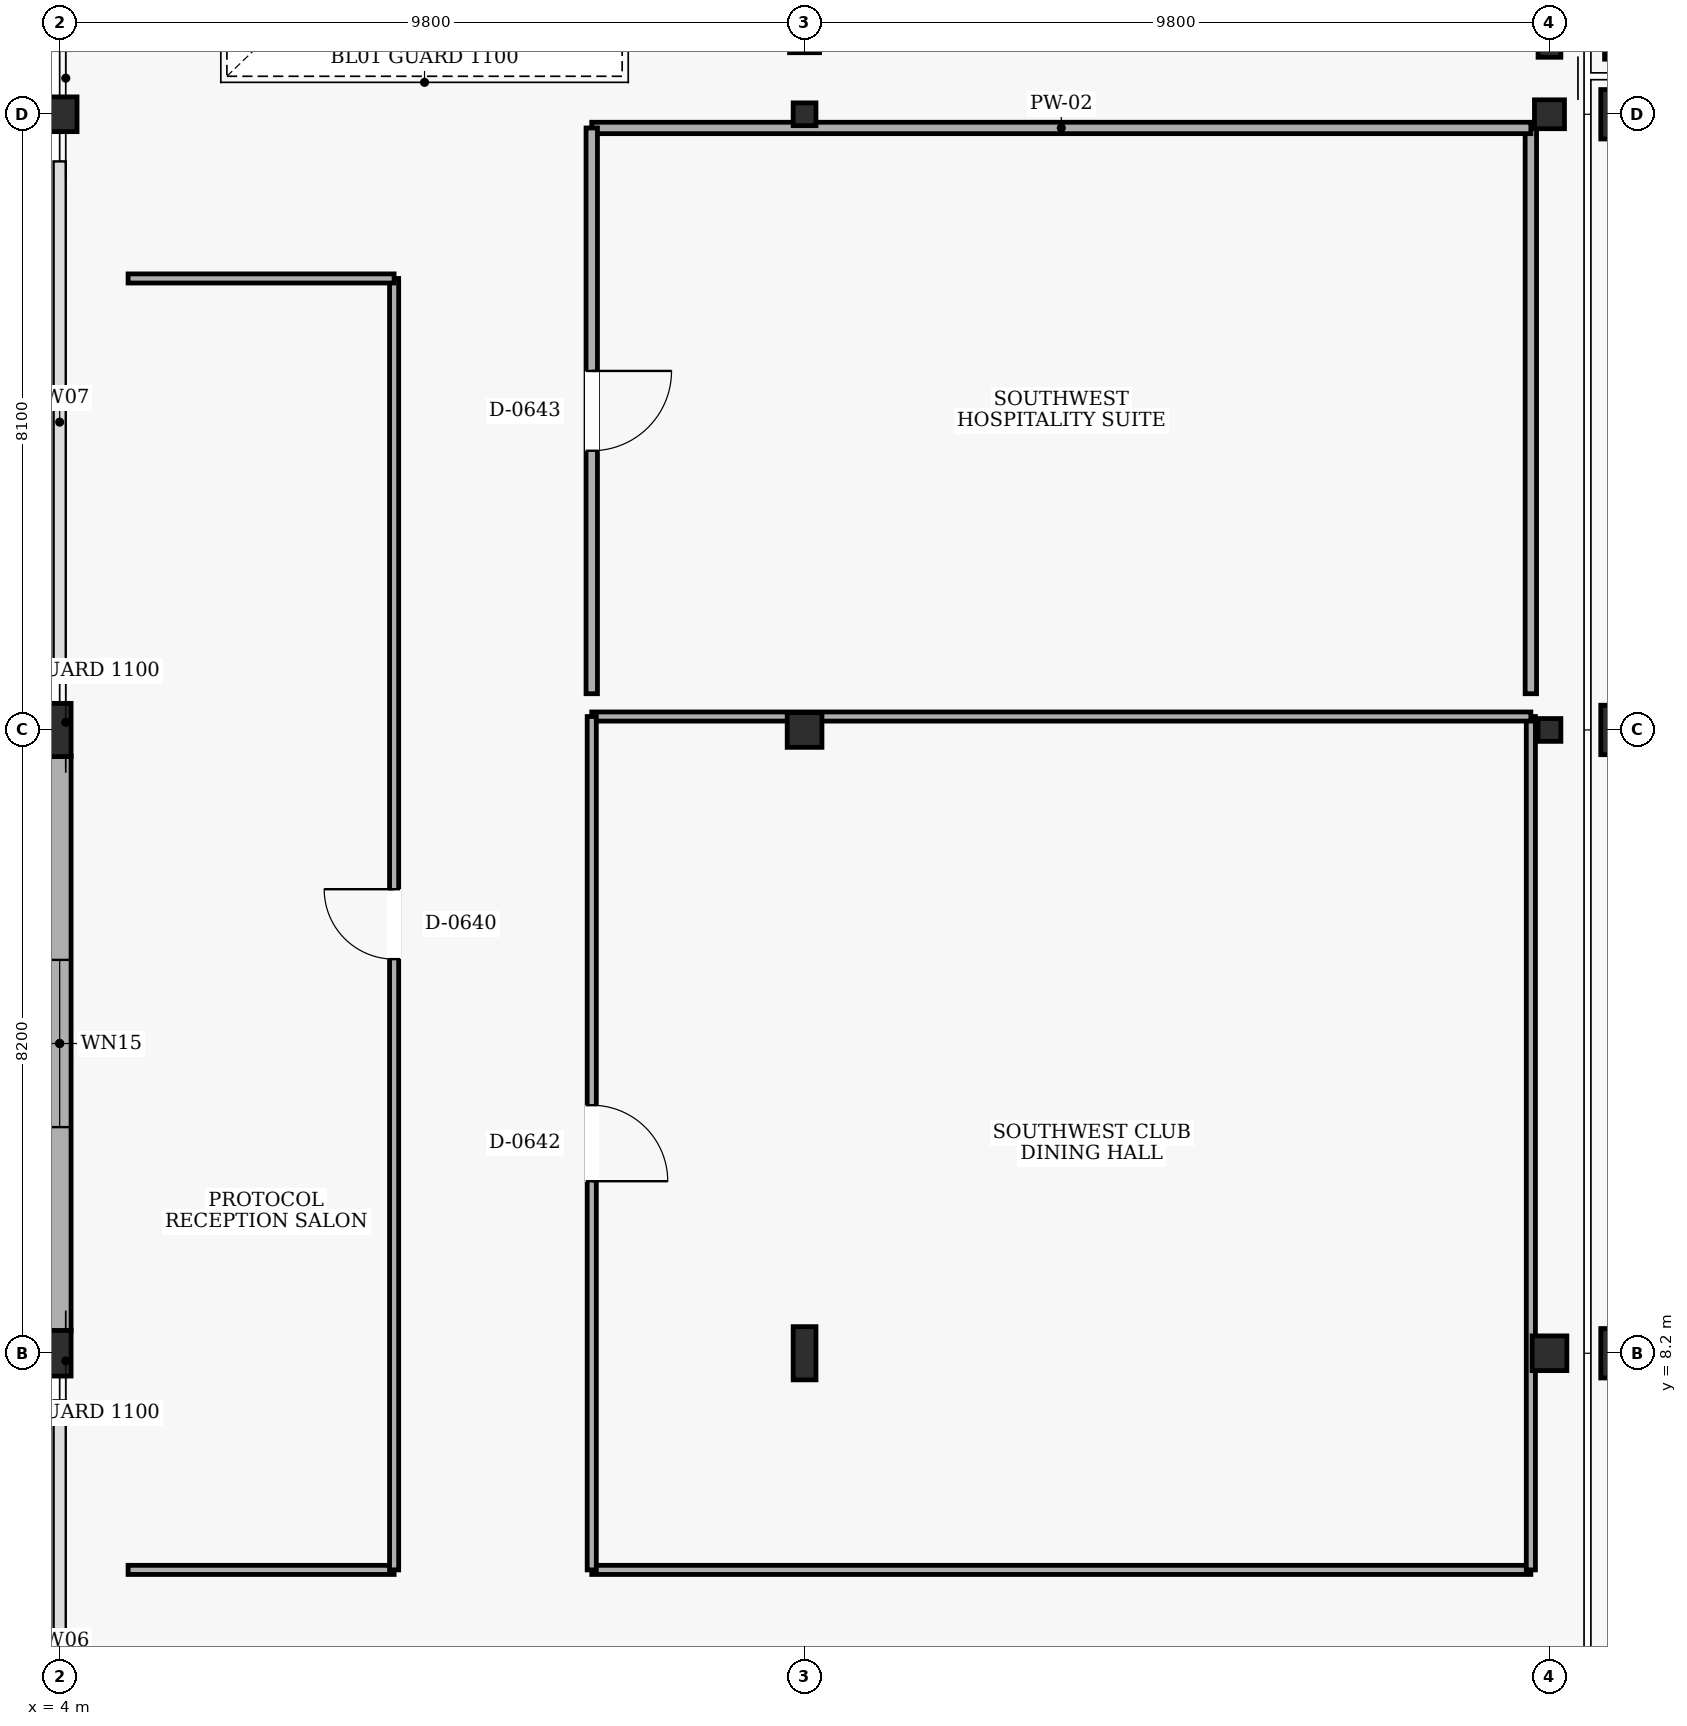
"""IFC4 building model, lengths in metres.
Left out: names, types, materials, properties, quantities, classifications, styles, units other than length and angle.
Written with IfcOpenShell. Run it as: python <this file> out.ifc"""

import sys

from ifc_helpers import new_model, si_unit, direction, frame, frame_2d, origin, origin_2d, place, context, subcontext, project, spatial, rectangle, hollow_rectangle, hollow_circle, i_section, extrude, element, fill, save


model = new_model("IFC4")
c1 = context("Model", 3, precision=1e-05, world=origin(), true_north=direction((0.0, 1.0)))
c2 = subcontext(c1, "Body", "Model", "MODEL_VIEW")
j1 = project(units=[si_unit("LENGTHUNIT", "METRE"), si_unit("PLANEANGLEUNIT", "RADIAN")], contexts=[c1])
p1 = place(None, origin())
s1 = spatial("IfcSite", under=j1, at=p1, CompositionType="ELEMENT")
p2 = place(p1, origin())
s2 = spatial("IfcBuilding", under=s1, at=p2, CompositionType="ELEMENT")
p3 = place(p2, frame((0.0, 0.0, 10.2)))
s3 = spatial("IfcBuildingStorey", under=s2, at=p3, CompositionType="ELEMENT", Elevation=10.2)
p4 = place(p3, frame((4.0, 8.2, 0.0), z_axis=(0.0, 0.0, 1.0), x_axis=(1.0, 0.0, 0.0)))
e1 = element("IfcColumn", 1, at=p4, inside=s3, PredefinedType="COLUMN", context=c2, shape_type="SweptSolid", body=[
    extrude(i_section(OverallWidth=0.3, OverallDepth=0.6, WebThickness=0.015, FlangeThickness=0.03, at=origin_2d()), origin(), (0.0, 0.0, 1.0), 4.8),
])
p5 = place(p3, frame((4.0, 16.4, 0.0), z_axis=(0.0, 0.0, 1.0), x_axis=(1.0, 0.0, 0.0)))
e2 = element("IfcColumn", 2, at=p5, inside=s3, PredefinedType="COLUMN", context=c2, shape_type="SweptSolid", body=[
    extrude(i_section(OverallWidth=0.3, OverallDepth=0.7, WebThickness=0.017, FlangeThickness=0.032, at=origin_2d()), origin(), (0.0, 0.0, 1.0), 4.8),
])
p6 = place(p3, frame((4.0, 24.5, 0.0), z_axis=(0.0, 0.0, 1.0), x_axis=(1.0, 0.0, 0.0)))
e3 = element("IfcColumn", 3, at=p6, inside=s3, PredefinedType="COLUMN", context=c2, shape_type="SweptSolid", body=[
    extrude(hollow_circle(Radius=0.229, WallThickness=0.02, at=origin_2d()), origin(), (0.0, 0.0, 1.0), 4.8),
])
p7 = place(p3, frame((13.8, 8.2, 0.0), z_axis=(0.0, 0.0, 1.0), x_axis=(1.0, 0.0, 0.0)))
e4 = element("IfcColumn", 4, at=p7, inside=s3, PredefinedType="COLUMN", context=c2, shape_type="SweptSolid", body=[
    extrude(i_section(OverallWidth=0.3, OverallDepth=0.7, WebThickness=0.017, FlangeThickness=0.032, at=origin_2d()), origin(), (0.0, 0.0, 1.0), 4.8),
])
p8 = place(p3, frame((13.8, 16.4, 0.0), z_axis=(0.0, 0.0, 1.0), x_axis=(1.0, 0.0, 0.0)))
e5 = element("IfcColumn", 5, at=p8, inside=s3, PredefinedType="COLUMN", context=c2, shape_type="SweptSolid", body=[
    extrude(hollow_circle(Radius=0.229, WallThickness=0.02, at=origin_2d()), origin(), (0.0, 0.0, 1.0), 4.8),
])
p9 = place(p3, frame((13.8, 24.5, 0.0), z_axis=(0.0, 0.0, 1.0), x_axis=(1.0, 0.0, 0.0)))
e6 = element("IfcColumn", 6, at=p9, inside=s3, PredefinedType="COLUMN", context=c2, shape_type="SweptSolid", body=[
    extrude(hollow_rectangle(XDim=0.3, YDim=0.3, WallThickness=0.016, at=origin_2d()), origin(), (0.0, 0.0, 1.0), 4.8),
])
p10 = place(p3, frame((13.8, 25.5, 0.0), z_axis=(0.0, 0.0, 1.0), x_axis=(1.0, 0.0, 0.0)))
e7 = element("IfcColumn", 7, at=p10, inside=s3, PredefinedType="COLUMN", context=c2, shape_type="SweptSolid", body=[
    extrude(i_section(OverallWidth=0.395, OverallDepth=0.38, WebThickness=0.019, FlangeThickness=0.03, at=origin_2d()), origin(), (0.0, 0.0, 1.0), 4.8),
])
p11 = place(p3, frame((23.6, 8.2, 0.0), z_axis=(0.0, 0.0, 1.0), x_axis=(1.0, 0.0, 0.0)))
e8 = element("IfcColumn", 8, at=p11, inside=s3, PredefinedType="COLUMN", context=c2, shape_type="SweptSolid", body=[
    extrude(hollow_circle(Radius=0.229, WallThickness=0.02, at=origin_2d()), origin(), (0.0, 0.0, 1.0), 4.8),
])
p12 = place(p3, frame((23.6, 16.4, 0.0), z_axis=(0.0, 0.0, 1.0), x_axis=(1.0, 0.0, 0.0)))
e9 = element("IfcColumn", 9, at=p12, inside=s3, PredefinedType="COLUMN", context=c2, shape_type="SweptSolid", body=[
    extrude(hollow_rectangle(XDim=0.3, YDim=0.3, WallThickness=0.016, at=origin_2d()), origin(), (0.0, 0.0, 1.0), 4.8),
])
p13 = place(p3, frame((23.6, 24.5, 0.0), z_axis=(0.0, 0.0, 1.0), x_axis=(1.0, 0.0, 0.0)))
e10 = element("IfcColumn", 10, at=p13, inside=s3, PredefinedType="COLUMN", context=c2, shape_type="SweptSolid", body=[
    extrude(i_section(OverallWidth=0.395, OverallDepth=0.38, WebThickness=0.019, FlangeThickness=0.03, at=origin_2d()), origin(), (0.0, 0.0, 1.0), 4.8),
])
p14 = place(p3, frame((23.6, 25.5, 0.0), z_axis=(0.0, 0.0, 1.0), x_axis=(1.0, 0.0, 0.0)))
e11 = element("IfcColumn", 11, at=p14, inside=s3, PredefinedType="COLUMN", context=c2, shape_type="SweptSolid", body=[
    extrude(i_section(OverallWidth=0.3, OverallDepth=0.5, WebThickness=0.014, FlangeThickness=0.028, at=origin_2d()), origin(), (0.0, 0.0, 1.0), 4.8),
])
for number, where, z_axis, x_axis in (
    (12, (24.6, 8.2, 0.0), (0.0, 0.0, 1.0), (1.0, 0.0, 0.0)),
    (13, (24.6, 16.4, 0.0), (0.0, 0.0, 1.0), (1.0, 0.0, 0.0)),
    (14, (24.6, 24.5, 0.0), (0.0, 0.0, 1.0), (1.0, 0.0, 0.0)),
):
    element("IfcColumn", number, at=place(p3, frame(where, z_axis=z_axis, x_axis=x_axis)), inside=s3, PredefinedType="COLUMN", context=c2, shape_type="SweptSolid", body=[
        extrude(rectangle(XDim=0.65, YDim=0.65, at=origin_2d()), origin(), (0.0, 0.0, 1.0), 4.8),
    ])
p15 = place(p3, frame((24.6, 25.5, 0.0), z_axis=(0.0, 0.0, 1.0), x_axis=(1.0, 0.0, 0.0)))
e15 = element("IfcColumn", 15, at=p15, inside=s3, PredefinedType="COLUMN", context=c2, shape_type="SweptSolid", body=[
    extrude(rectangle(XDim=0.55, YDim=0.55, at=origin_2d()), origin(), (0.0, 0.0, 1.0), 4.8),
])
p16 = place(p3, frame((4.0, 8.495, 0.0), z_axis=(0.0, 0.0, 1.0), x_axis=(0.0, 1.0, 0.0)))
e16 = element("IfcWall", 16, at=p16, inside=s3, PredefinedType="SOLIDWALL", context=c2, shape_type="SweptSolid", body=[
    extrude(rectangle(XDim=7.56, YDim=0.3, at=frame_2d((3.78, 0.0))), origin(), (0.0, 0.0, 1.0), 3.78),
])
p17 = place(p16, frame((2.68, 0.0, 0.9)))
e17 = element("IfcOpeningElement", 17, at=p17, cuts=e16, PredefinedType="OPENING", context=c2, shape_type="SweptSolid", body=[
    extrude(rectangle(XDim=2.2, YDim=2.1, at=frame_2d((1.1, 1.05))), frame((0.0, 0.16, 0.0), z_axis=(0.0, -1.0, 0.0), x_axis=(1.0, 0.0, 0.0)), (0.0, 0.0, 1.0), 0.32),
])
p18 = place(p3, frame((4.9, 5.35, 0.0), z_axis=(0.0, 0.0, 1.0), x_axis=(1.0, 0.0, 0.0)))
e18 = element("IfcWall", 18, at=p18, inside=s3, PredefinedType="PARTITIONING", context=c2, shape_type="SweptSolid", body=[
    extrude(rectangle(XDim=3.5, YDim=0.12, at=frame_2d((1.75, 0.0))), origin(), (0.0, 0.0, 1.0), 4.48),
])
p19 = place(p3, frame((8.4, 5.35, 0.0), z_axis=(0.0, 0.0, 1.0), x_axis=(0.0, 1.0, 0.0)))
e19 = element("IfcWall", 19, at=p19, inside=s3, PredefinedType="PARTITIONING", context=c2, shape_type="SweptSolid", body=[
    extrude(rectangle(XDim=16.99, YDim=0.12, at=frame_2d((8.495, 0.0))), origin(), (0.0, 0.0, 1.0), 4.48),
])
p20 = place(p19, frame((8.035, 0.0, 0.0)))
e20 = element("IfcOpeningElement", 20, at=p20, cuts=e19, PredefinedType="OPENING", context=c2, shape_type="SweptSolid", body=[
    extrude(rectangle(XDim=0.92, YDim=2.1, at=frame_2d((0.46, 1.05))), frame((0.0, 0.07, 0.0), z_axis=(0.0, -1.0, 0.0), x_axis=(1.0, 0.0, 0.0)), (0.0, 0.0, 1.0), 0.14),
])
p21 = place(p3, frame((8.4, 22.34, 0.0), z_axis=(0.0, 0.0, 1.0), x_axis=(-1.0, 0.0, 0.0)))
e21 = element("IfcWall", 21, at=p21, inside=s3, PredefinedType="PARTITIONING", context=c2, shape_type="SweptSolid", body=[
    extrude(rectangle(XDim=3.5, YDim=0.12, at=frame_2d((1.75, 0.0))), origin(), (0.0, 0.0, 1.0), 4.48),
])
p22 = place(p3, frame((11.0, 5.35, 0.0), z_axis=(0.0, 0.0, 1.0), x_axis=(1.0, 0.0, 0.0)))
e22 = element("IfcWall", 22, at=p22, inside=s3, PredefinedType="PARTITIONING", context=c2, shape_type="SweptSolid", body=[
    extrude(rectangle(XDim=12.355, YDim=0.12, at=frame_2d((6.177, 0.0))), origin(), (0.0, 0.0, 1.0), 4.48),
])
p23 = place(p3, frame((23.355, 5.35, 0.0), z_axis=(0.0, 0.0, 1.0), x_axis=(0.0, 1.0, 0.0)))
e23 = element("IfcWall", 23, at=p23, inside=s3, PredefinedType="PARTITIONING", context=c2, shape_type="SweptSolid", body=[
    extrude(rectangle(XDim=11.227, YDim=0.12, at=frame_2d((5.613, 0.0))), origin(), (0.0, 0.0, 1.0), 3.78),
])
p24 = place(p3, frame((23.355, 16.577, 0.0), z_axis=(0.0, 0.0, 1.0), x_axis=(-1.0, 0.0, 0.0)))
e24 = element("IfcWall", 24, at=p24, inside=s3, PredefinedType="PARTITIONING", context=c2, shape_type="SweptSolid", body=[
    extrude(rectangle(XDim=12.355, YDim=0.12, at=frame_2d((6.177, 0.0))), origin(), (0.0, 0.0, 1.0), 3.88),
])
p25 = place(p3, frame((11.0, 16.577, 0.0), z_axis=(0.0, 0.0, 1.0), x_axis=(0.0, -1.0, 0.0)))
e25 = element("IfcWall", 25, at=p25, inside=s3, PredefinedType="PARTITIONING", context=c2, shape_type="SweptSolid", body=[
    extrude(rectangle(XDim=11.227, YDim=0.12, at=frame_2d((5.613, 0.0))), origin(), (0.0, 0.0, 1.0), 4.48),
])
p26 = place(p25, frame((5.113, 0.0, 0.0)))
e26 = element("IfcOpeningElement", 26, at=p26, cuts=e25, PredefinedType="OPENING", context=c2, shape_type="SweptSolid", body=[
    extrude(rectangle(XDim=1.0, YDim=2.1, at=frame_2d((0.5, 1.05))), frame((0.0, 0.07, 0.0), z_axis=(0.0, -1.0, 0.0), x_axis=(1.0, 0.0, 0.0)), (0.0, 0.0, 1.0), 0.14),
])
p27 = place(p3, frame((23.355, 16.877, 0.0), z_axis=(0.0, 0.0, 1.0), x_axis=(0.0, 1.0, 0.0)))
e27 = element("IfcWall", 27, at=p27, inside=s3, PredefinedType="PARTITIONING", context=c2, shape_type="SweptSolid", body=[
    extrude(rectangle(XDim=7.443, YDim=0.15, at=frame_2d((3.722, 0.0))), origin(), (0.0, 0.0, 1.0), 3.78),
])
p28 = place(p3, frame((23.355, 24.32, 0.0), z_axis=(0.0, 0.0, 1.0), x_axis=(-1.0, 0.0, 0.0)))
e28 = element("IfcWall", 28, at=p28, inside=s3, PredefinedType="PARTITIONING", context=c2, shape_type="SweptSolid", body=[
    extrude(rectangle(XDim=12.355, YDim=0.15, at=frame_2d((6.177, 0.0))), origin(), (0.0, 0.0, 1.0), 3.88),
])
p29 = place(p3, frame((11.0, 24.32, 0.0), z_axis=(0.0, 0.0, 1.0), x_axis=(0.0, -1.0, 0.0)))
e29 = element("IfcWall", 29, at=p29, inside=s3, PredefinedType="PARTITIONING", context=c2, shape_type="SweptSolid", body=[
    extrude(rectangle(XDim=7.443, YDim=0.15, at=frame_2d((3.722, 0.0))), origin(), (0.0, 0.0, 1.0), 4.48),
])
p30 = place(p29, frame((3.197, 0.0, 0.0)))
e30 = element("IfcOpeningElement", 30, at=p30, cuts=e29, PredefinedType="OPENING", context=c2, shape_type="SweptSolid", body=[
    extrude(rectangle(XDim=1.05, YDim=2.15, at=frame_2d((0.525, 1.075))), frame((0.0, 0.085, 0.0), z_axis=(0.0, -1.0, 0.0), x_axis=(1.0, 0.0, 0.0)), (0.0, 0.0, 1.0), 0.17),
])
p31 = place(p17, origin())
e31 = element("IfcWindow", 31, at=p31, inside=s3, PartitioningType="SINGLE_PANEL", PredefinedType="WINDOW", context=c2, shape_type="SweptSolid", body=[
    extrude(rectangle(XDim=2.2, YDim=2.1, at=frame_2d((1.1, 1.05))), frame((0.0, 0.03, 0.0), z_axis=(0.0, -1.0, 0.0), x_axis=(1.0, 0.0, 0.0)), (0.0, 0.0, 1.0), 0.06),
])
fill(e17, e31)
p32 = place(p20, origin())
e32 = element("IfcDoor", 32, at=p32, inside=s3, OperationType="SINGLE_SWING_RIGHT", PredefinedType="DOOR", context=c2, shape_type="SweptSolid", body=[
    extrude(rectangle(XDim=0.92, YDim=2.1, at=frame_2d((0.46, 1.05))), frame((0.0, 0.025, 0.0), z_axis=(0.0, -1.0, 0.0), x_axis=(1.0, 0.0, 0.0)), (0.0, 0.0, 1.0), 0.05),
])
fill(e20, e32)
p33 = place(p26, origin())
e33 = element("IfcDoor", 33, at=p33, inside=s3, OperationType="SINGLE_SWING_RIGHT", PredefinedType="DOOR", context=c2, shape_type="SweptSolid", body=[
    extrude(rectangle(XDim=1.0, YDim=2.1, at=frame_2d((0.5, 1.05))), frame((0.0, 0.025, 0.0), z_axis=(0.0, -1.0, 0.0), x_axis=(1.0, 0.0, 0.0)), (0.0, 0.0, 1.0), 0.05),
])
fill(e26, e33)
p34 = place(p30, origin())
e34 = element("IfcDoor", 34, at=p34, inside=s3, OperationType="SINGLE_SWING_LEFT", PredefinedType="DOOR", context=c2, shape_type="SweptSolid", body=[
    extrude(rectangle(XDim=1.05, YDim=2.15, at=frame_2d((0.525, 1.075))), frame((0.0, 0.025, 0.0), z_axis=(0.0, -1.0, 0.0), x_axis=(1.0, 0.0, 0.0)), (0.0, 0.0, 1.0), 0.05),
])
fill(e30, e34)
save(model, sys.argv[1])
